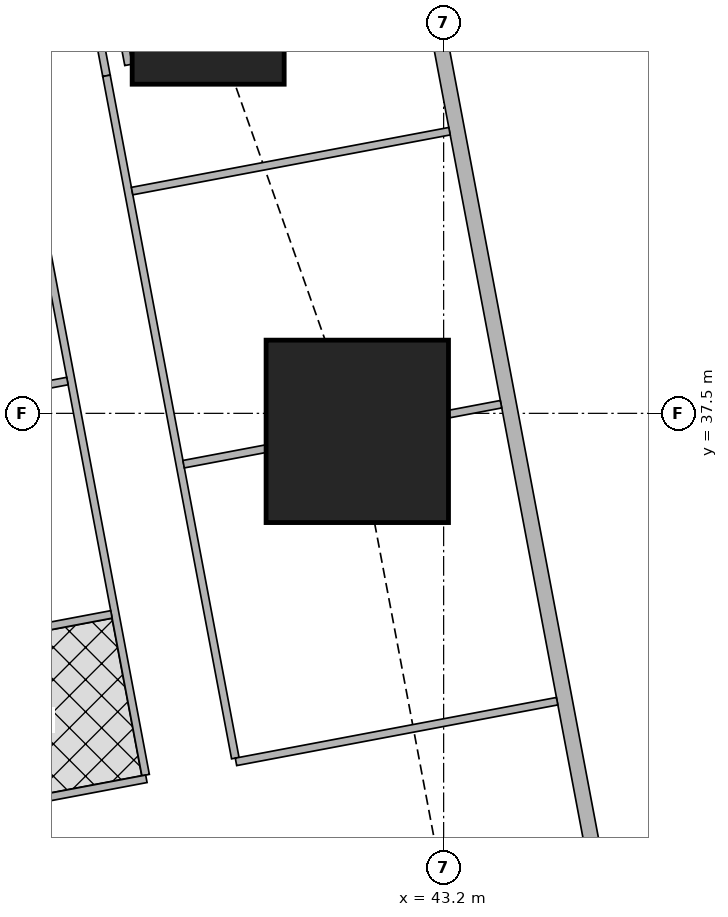
"""IFC4 building model, lengths in metres.
Left out: names, types, materials, properties, quantities, classifications, styles, units other than length and angle.
Written with IfcOpenShell. Run it as: python <this file> out.ifc"""

import sys

from ifc_helpers import new_model, si_unit, direction, frame, frame_2d, origin, origin_2d, place, context, subcontext, project, spatial, rectangle, extrude, element, fill, save


model = new_model("IFC4")
c1 = context("Model", 3, precision=1e-05, world=origin(), true_north=direction((0.0, 1.0)))
c2 = subcontext(c1, "Body", "Model", "MODEL_VIEW")
j1 = project(units=[si_unit("LENGTHUNIT", "METRE"), si_unit("PLANEANGLEUNIT", "RADIAN")], contexts=[c1])
p1 = place(None, origin())
s1 = spatial("IfcSite", under=j1, at=p1, CompositionType="ELEMENT")
p2 = place(p1, origin())
s2 = spatial("IfcBuilding", under=s1, at=p2, CompositionType="ELEMENT")
p3 = place(p2, frame((0.0, 0.0, 234.95)))
s3 = spatial("IfcBuildingStorey", under=s2, at=p3, CompositionType="ELEMENT", Elevation=234.95)
p4 = place(p3, frame((42.064, 37.263, 0.0), z_axis=(0.0, 0.0, 1.0), x_axis=(1.0, 0.0, 0.0)))
e1 = element("IfcColumn", 1, at=p4, inside=s3, PredefinedType="COLUMN", context=c2, shape_type="SweptSolid", body=[
    extrude(rectangle(XDim=2.4, YDim=2.4, at=origin_2d()), origin(), (0.0, 0.0, 1.0), 3.75),
])
p5 = place(p3, frame((40.102, 42.83, 0.0), z_axis=(0.0, 0.0, 1.0), x_axis=(1.0, 0.0, 0.0)))
e2 = element("IfcColumn", 2, at=p5, inside=s3, PredefinedType="COLUMN", context=c2, shape_type="SweptSolid", body=[
    extrude(rectangle(XDim=2.0, YDim=2.0, at=origin_2d()), origin(), (0.0, 0.0, 1.0), 3.75),
])
p6 = place(p3, frame((50.653, 2.703, 0.0), z_axis=(0.0, 0.0, 1.0), x_axis=(-0.185612026696, 0.982623109613, 0.0)))
e3 = element("IfcWall", 3, at=p6, inside=s3, PredefinedType="SOLIDWALL", context=c2, shape_type="SweptSolid", body=[
    extrude(rectangle(XDim=41.393, YDim=0.2, at=frame_2d((20.697, 0.0))), origin(), (0.0, 0.0, 1.0), 3.5),
])
p7 = place(p6, frame((1.633, 0.0, 0.9)))
e4 = element("IfcOpeningElement", 4, at=p7, cuts=e3, PredefinedType="OPENING", context=c2, shape_type="SweptSolid", body=[
    extrude(rectangle(XDim=1.8, YDim=1.5, at=frame_2d((0.9, 0.75))), frame((0.0, 0.11, 0.0), z_axis=(0.0, -1.0, 0.0), x_axis=(1.0, 0.0, 0.0)), (0.0, 0.0, 1.0), 0.22),
])
p8 = place(p6, frame((6.032, 0.0, 0.9)))
e5 = element("IfcOpeningElement", 5, at=p8, cuts=e3, PredefinedType="OPENING", context=c2, shape_type="SweptSolid", body=[
    extrude(rectangle(XDim=1.8, YDim=1.5, at=frame_2d((0.9, 0.75))), frame((0.0, 0.11, 0.0), z_axis=(0.0, -1.0, 0.0), x_axis=(1.0, 0.0, 0.0)), (0.0, 0.0, 1.0), 0.22),
])
p9 = place(p6, frame((9.848, 0.0, 0.9)))
e6 = element("IfcOpeningElement", 6, at=p9, cuts=e3, PredefinedType="OPENING", context=c2, shape_type="SweptSolid", body=[
    extrude(rectangle(XDim=1.8, YDim=1.5, at=frame_2d((0.9, 0.75))), frame((0.0, 0.11, 0.0), z_axis=(0.0, -1.0, 0.0), x_axis=(1.0, 0.0, 0.0)), (0.0, 0.0, 1.0), 0.22),
])
p10 = place(p6, frame((13.664, 0.0, 0.9)))
e7 = element("IfcOpeningElement", 7, at=p10, cuts=e3, PredefinedType="OPENING", context=c2, shape_type="SweptSolid", body=[
    extrude(rectangle(XDim=1.8, YDim=1.5, at=frame_2d((0.9, 0.75))), frame((0.0, 0.11, 0.0), z_axis=(0.0, -1.0, 0.0), x_axis=(1.0, 0.0, 0.0)), (0.0, 0.0, 1.0), 0.22),
])
p11 = place(p6, frame((17.481, 0.0, 0.9)))
e8 = element("IfcOpeningElement", 8, at=p11, cuts=e3, PredefinedType="OPENING", context=c2, shape_type="SweptSolid", body=[
    extrude(rectangle(XDim=1.8, YDim=1.5, at=frame_2d((0.9, 0.75))), frame((0.0, 0.11, 0.0), z_axis=(0.0, -1.0, 0.0), x_axis=(1.0, 0.0, 0.0)), (0.0, 0.0, 1.0), 0.22),
])
p12 = place(p6, frame((21.297, 0.0, 0.9)))
e9 = element("IfcOpeningElement", 9, at=p12, cuts=e3, PredefinedType="OPENING", context=c2, shape_type="SweptSolid", body=[
    extrude(rectangle(XDim=1.8, YDim=1.5, at=frame_2d((0.9, 0.75))), frame((0.0, 0.11, 0.0), z_axis=(0.0, -1.0, 0.0), x_axis=(1.0, 0.0, 0.0)), (0.0, 0.0, 1.0), 0.22),
])
p13 = place(p6, frame((25.113, 0.0, 0.9)))
e10 = element("IfcOpeningElement", 10, at=p13, cuts=e3, PredefinedType="OPENING", context=c2, shape_type="SweptSolid", body=[
    extrude(rectangle(XDim=1.8, YDim=1.5, at=frame_2d((0.9, 0.75))), frame((0.0, 0.11, 0.0), z_axis=(0.0, -1.0, 0.0), x_axis=(1.0, 0.0, 0.0)), (0.0, 0.0, 1.0), 0.22),
])
p14 = place(p6, frame((28.93, 0.0, 0.9)))
e11 = element("IfcOpeningElement", 11, at=p14, cuts=e3, PredefinedType="OPENING", context=c2, shape_type="SweptSolid", body=[
    extrude(rectangle(XDim=1.8, YDim=1.5, at=frame_2d((0.9, 0.75))), frame((0.0, 0.11, 0.0), z_axis=(0.0, -1.0, 0.0), x_axis=(1.0, 0.0, 0.0)), (0.0, 0.0, 1.0), 0.22),
])
p15 = place(p6, frame((32.746, 0.0, 0.9)))
e12 = element("IfcOpeningElement", 12, at=p15, cuts=e3, PredefinedType="OPENING", context=c2, shape_type="SweptSolid", body=[
    extrude(rectangle(XDim=1.8, YDim=1.5, at=frame_2d((0.9, 0.75))), frame((0.0, 0.11, 0.0), z_axis=(0.0, -1.0, 0.0), x_axis=(1.0, 0.0, 0.0)), (0.0, 0.0, 1.0), 0.22),
])
p16 = place(p6, frame((36.481, 0.0, 0.9)))
e13 = element("IfcOpeningElement", 13, at=p16, cuts=e3, PredefinedType="OPENING", context=c2, shape_type="SweptSolid", body=[
    extrude(rectangle(XDim=1.8, YDim=1.5, at=frame_2d((0.9, 0.75))), frame((0.0, 0.11, 0.0), z_axis=(0.0, -1.0, 0.0), x_axis=(1.0, 0.0, 0.0)), (0.0, 0.0, 1.0), 0.22),
])
p17 = place(p3, frame((33.933, 42.73, 0.0), z_axis=(0.0, 0.0, 1.0), x_axis=(0.185595417643, -0.982626246825, 0.0)))
e14 = element("IfcWall", 14, at=p17, inside=s3, PredefinedType="SOLIDWALL", context=c2, shape_type="SweptSolid", body=[
    extrude(rectangle(XDim=41.051, YDim=0.15, at=frame_2d((20.525, 0.0))), origin(), (0.0, 0.0, 1.0), 2.5),
])
p18 = place(p17, frame((12.266, 0.0, 0.0)))
e15 = element("IfcOpeningElement", 15, at=p18, cuts=e14, PredefinedType="OPENING", context=c2, shape_type="SweptSolid", body=[
    extrude(rectangle(XDim=1.0, YDim=2.1, at=frame_2d((0.5, 1.05))), frame((0.0, 0.085, 0.0), z_axis=(0.0, -1.0, 0.0), x_axis=(1.0, 0.0, 0.0)), (0.0, 0.0, 1.0), 0.17),
])
p19 = place(p17, frame((16.082, 0.0, 0.0)))
e16 = element("IfcOpeningElement", 16, at=p19, cuts=e14, PredefinedType="OPENING", context=c2, shape_type="SweptSolid", body=[
    extrude(rectangle(XDim=1.0, YDim=2.1, at=frame_2d((0.5, 1.05))), frame((0.0, 0.085, 0.0), z_axis=(0.0, -1.0, 0.0), x_axis=(1.0, 0.0, 0.0)), (0.0, 0.0, 1.0), 0.17),
])
p20 = place(p17, frame((30.862, 0.0, 0.0)))
e17 = element("IfcOpeningElement", 17, at=p20, cuts=e14, PredefinedType="OPENING", context=c2, shape_type="SweptSolid", body=[
    extrude(rectangle(XDim=1.0, YDim=2.1, at=frame_2d((0.5, 1.05))), frame((0.0, 0.085, 0.0), z_axis=(0.0, -1.0, 0.0), x_axis=(1.0, 0.0, 0.0)), (0.0, 0.0, 1.0), 0.17),
])
p21 = place(p3, frame((39.054, 42.085, 0.0), z_axis=(0.0, 0.0, 1.0), x_axis=(-0.185791584218, 0.982589175207, 0.0)))
e18 = element("IfcWall", 18, at=p21, inside=s3, PredefinedType="PARTITIONING", context=c2, shape_type="SweptSolid", body=[
    extrude(rectangle(XDim=3.628, YDim=0.1, at=frame_2d((1.814, 0.0))), origin(), (0.0, 0.0, 1.0), 2.05),
])
p22 = place(p3, frame((38.256, 44.628, 0.0), z_axis=(0.0, 0.0, 1.0), x_axis=(0.185700639943, -0.982606366927, 0.0)))
e19 = element("IfcWall", 19, at=p22, inside=s3, PredefinedType="PARTITIONING", context=c2, shape_type="SweptSolid", body=[
    extrude(rectangle(XDim=2.735, YDim=0.1, at=frame_2d((1.367, 0.0))), origin(), (0.0, 0.0, 1.0), 2.05),
])
p23 = place(p3, frame((38.764, 41.941, 0.0), z_axis=(0.0, 0.0, 1.0), x_axis=(0.185548572312, -0.982635093671, 0.0)))
e20 = element("IfcWall", 20, at=p23, inside=s3, PredefinedType="PARTITIONING", context=c2, shape_type="SweptSolid", body=[
    extrude(rectangle(XDim=9.135, YDim=0.1, at=frame_2d((4.568, 0.0))), origin(), (0.0, 0.0, 1.0), 3.5),
])
p24 = place(p23, frame((8.085, 0.0, 0.0)))
e21 = element("IfcOpeningElement", 21, at=p24, cuts=e20, PredefinedType="OPENING", context=c2, shape_type="SweptSolid", body=[
    extrude(rectangle(XDim=0.9, YDim=2.1, at=frame_2d((0.45, 1.05))), frame((0.0, 0.06, 0.0), z_axis=(0.0, -1.0, 0.0), x_axis=(1.0, 0.0, 0.0)), (0.0, 0.0, 1.0), 0.12),
])
p25 = place(p23, frame((3.7, 0.0, 0.0)))
e22 = element("IfcOpeningElement", 22, at=p25, cuts=e20, PredefinedType="OPENING", context=c2, shape_type="SweptSolid", body=[
    extrude(rectangle(XDim=0.9, YDim=2.1, at=frame_2d((0.45, 1.05))), frame((0.0, 0.06, 0.0), z_axis=(0.0, -1.0, 0.0), x_axis=(1.0, 0.0, 0.0)), (0.0, 0.0, 1.0), 0.12),
])
p26 = place(p3, frame((37.473, 42.309, 0.0), z_axis=(0.0, 0.0, 1.0), x_axis=(0.185491912953, -0.982645790827, 0.0)))
e23 = element("IfcWall", 23, at=p26, inside=s3, PredefinedType="PARTITIONING", context=c2, shape_type="SweptSolid", body=[
    extrude(rectangle(XDim=9.737, YDim=0.1, at=frame_2d((4.869, 0.0))), origin(), (0.0, 0.0, 1.0), 3.5),
])
p27 = place(p26, frame((8.232, 0.0, 0.0)))
e24 = element("IfcOpeningElement", 24, at=p27, cuts=e23, PredefinedType="OPENING", context=c2, shape_type="SweptSolid", body=[
    extrude(rectangle(XDim=0.9, YDim=2.1, at=frame_2d((0.45, 1.05))), frame((0.0, 0.06, 0.0), z_axis=(0.0, -1.0, 0.0), x_axis=(1.0, 0.0, 0.0)), (0.0, 0.0, 1.0), 0.12),
])
p28 = place(p26, frame((2.853, 0.0, 0.0)))
e25 = element("IfcOpeningElement", 25, at=p28, cuts=e23, PredefinedType="OPENING", context=c2, shape_type="SweptSolid", body=[
    extrude(rectangle(XDim=0.9, YDim=2.1, at=frame_2d((0.45, 1.05))), frame((0.0, 0.06, 0.0), z_axis=(0.0, -1.0, 0.0), x_axis=(1.0, 0.0, 0.0)), (0.0, 0.0, 1.0), 0.12),
])
p29 = place(p26, frame((5.564, 0.0, 0.0)))
e26 = element("IfcOpeningElement", 26, at=p29, cuts=e23, PredefinedType="OPENING", context=c2, shape_type="SweptSolid", body=[
    extrude(rectangle(XDim=0.9, YDim=2.1, at=frame_2d((0.45, 1.05))), frame((0.0, 0.06, 0.0), z_axis=(0.0, -1.0, 0.0), x_axis=(1.0, 0.0, 0.0)), (0.0, 0.0, 1.0), 0.12),
])
p30 = place(p3, frame((43.277, 41.212, 0.0), z_axis=(0.0, 0.0, 1.0), x_axis=(-0.982665405803, -0.185387972203, 0.0)))
e27 = element("IfcWall", 27, at=p30, inside=s3, PredefinedType="PARTITIONING", context=c2, shape_type="SweptSolid", body=[
    extrude(rectangle(XDim=4.25, YDim=0.1, at=frame_2d((2.125, 0.0))), origin(), (0.0, 0.0, 1.0), 2.05),
])
p31 = place(p3, frame((43.955, 37.62, 0.0), z_axis=(0.0, 0.0, 1.0), x_axis=(-0.982495415327, -0.186286765128, 0.0)))
e28 = element("IfcWall", 28, at=p31, inside=s3, PredefinedType="PARTITIONING", context=c2, shape_type="SweptSolid", body=[
    extrude(rectangle(XDim=0.693, YDim=0.1, at=frame_2d((0.347, 0.0))), origin(), (0.0, 0.0, 1.0), 3.5),
])
p32 = place(p3, frame((40.854, 37.034, 0.0), z_axis=(0.0, 0.0, 1.0), x_axis=(-0.982651678759, -0.185460718839, 0.0)))
e29 = element("IfcWall", 29, at=p32, inside=s3, PredefinedType="PARTITIONING", context=c2, shape_type="SweptSolid", body=[
    extrude(rectangle(XDim=1.094, YDim=0.1, at=frame_2d((0.547, 0.0))), origin(), (0.0, 0.0, 1.0), 3.5),
])
p33 = place(p3, frame((44.693, 33.713, 0.0), z_axis=(0.0, 0.0, 1.0), x_axis=(-0.982633535512, -0.185556823879, 0.0)))
e30 = element("IfcWall", 30, at=p33, inside=s3, PredefinedType="PARTITIONING", context=c2, shape_type="SweptSolid", body=[
    extrude(rectangle(XDim=4.3, YDim=0.1, at=frame_2d((2.15, 0.0))), origin(), (0.0, 0.0, 1.0), 2.05),
])
p34 = place(p3, frame((38.25, 37.925, 0.0), z_axis=(0.0, 0.0, 1.0), x_axis=(-0.982610209589, -0.185680305934, 0.0)))
e31 = element("IfcWall", 31, at=p34, inside=s3, PredefinedType="PARTITIONING", context=c2, shape_type="SweptSolid", body=[
    extrude(rectangle(XDim=1.567, YDim=0.1, at=frame_2d((0.784, 0.0))), origin(), (0.0, 0.0, 1.0), 3.5),
])
p35 = place(p3, frame((39.289, 32.692, 0.0), z_axis=(0.0, 0.0, 1.0), x_axis=(-0.982633623707, -0.185556356831, 0.0)))
e32 = element("IfcWall", 32, at=p35, inside=s3, PredefinedType="PARTITIONING", context=c2, shape_type="SweptSolid", body=[
    extrude(rectangle(XDim=3.325, YDim=0.1, at=frame_2d((1.663, 0.0))), origin(), (0.0, 0.0, 1.0), 3.5),
])
p36 = place(p3, frame((38.829, 34.855, 0.0), z_axis=(0.0, 0.0, 1.0), x_axis=(-0.982610347627, -0.185679575441, 0.0)))
e33 = element("IfcWall", 33, at=p36, inside=s3, PredefinedType="PARTITIONING", context=c2, shape_type="SweptSolid", body=[
    extrude(rectangle(XDim=3.274, YDim=0.1, at=frame_2d((1.637, 0.0))), origin(), (0.0, 0.0, 1.0), 3.5),
])
p37 = place(p3, frame((38.202, 10.163, 0.0), z_axis=(0.0, 0.0, 1.0), x_axis=(-0.185610321132, 0.982623431783, 0.0)))
e34 = element("IfcWall", 34, at=p37, inside=s3, PredefinedType="PARTITIONING", context=c2, shape_type="SweptSolid", body=[
    extrude(rectangle(XDim=25.111, YDim=0.125, at=frame_2d((12.556, 0.0))), origin(), (0.0, 0.0, 1.0), 2.5),
])
p38 = place(p37, frame((0.708, 0.0, 0.0)))
e35 = element("IfcOpeningElement", 35, at=p38, cuts=e34, PredefinedType="OPENING", context=c2, shape_type="SweptSolid", body=[
    extrude(rectangle(XDim=1.0, YDim=2.1, at=frame_2d((0.5, 1.05))), frame((0.0, 0.073, 0.0), z_axis=(0.0, -1.0, 0.0), x_axis=(1.0, 0.0, 0.0)), (0.0, 0.0, 1.0), 0.145),
])
p39 = place(p37, frame((13.378, 0.0, 0.0)))
e36 = element("IfcOpeningElement", 36, at=p39, cuts=e34, PredefinedType="OPENING", context=c2, shape_type="SweptSolid", body=[
    extrude(rectangle(XDim=1.0, YDim=2.1, at=frame_2d((0.5, 1.05))), frame((0.0, 0.073, 0.0), z_axis=(0.0, -1.0, 0.0), x_axis=(1.0, 0.0, 0.0)), (0.0, 0.0, 1.0), 0.145),
])
p40 = place(p37, frame((21.15, 0.0, 0.0)))
e37 = element("IfcOpeningElement", 37, at=p40, cuts=e34, PredefinedType="OPENING", context=c2, shape_type="SweptSolid", body=[
    extrude(rectangle(XDim=1.0, YDim=2.1, at=frame_2d((0.5, 1.05))), frame((0.0, 0.073, 0.0), z_axis=(0.0, -1.0, 0.0), x_axis=(1.0, 0.0, 0.0)), (0.0, 0.0, 1.0), 0.145),
])
p41 = place(p37, frame((23.453, 0.0, 0.0)))
e38 = element("IfcOpeningElement", 38, at=p41, cuts=e34, PredefinedType="OPENING", context=c2, shape_type="SweptSolid", body=[
    extrude(rectangle(XDim=1.0, YDim=2.1, at=frame_2d((0.5, 1.05))), frame((0.0, 0.073, 0.0), z_axis=(0.0, -1.0, 0.0), x_axis=(1.0, 0.0, 0.0)), (0.0, 0.0, 1.0), 0.145),
])
p42 = place(p14, origin())
e39 = element("IfcWindow", 39, at=p42, inside=s3, PartitioningType="SINGLE_PANEL", PredefinedType="WINDOW", context=c2, shape_type="SweptSolid", body=[
    extrude(rectangle(XDim=1.8, YDim=1.5, at=frame_2d((0.9, 0.75))), frame((0.0, 0.03, 0.0), z_axis=(0.0, -1.0, 0.0), x_axis=(1.0, 0.0, 0.0)), (0.0, 0.0, 1.0), 0.06),
])
fill(e11, e39)
p43 = place(p15, origin())
e40 = element("IfcWindow", 40, at=p43, inside=s3, PartitioningType="SINGLE_PANEL", PredefinedType="WINDOW", context=c2, shape_type="SweptSolid", body=[
    extrude(rectangle(XDim=1.8, YDim=1.5, at=frame_2d((0.9, 0.75))), frame((0.0, 0.03, 0.0), z_axis=(0.0, -1.0, 0.0), x_axis=(1.0, 0.0, 0.0)), (0.0, 0.0, 1.0), 0.06),
])
fill(e12, e40)
p44 = place(p16, origin())
e41 = element("IfcWindow", 41, at=p44, inside=s3, PartitioningType="SINGLE_PANEL", PredefinedType="WINDOW", context=c2, shape_type="SweptSolid", body=[
    extrude(rectangle(XDim=1.8, YDim=1.5, at=frame_2d((0.9, 0.75))), frame((0.0, 0.03, 0.0), z_axis=(0.0, -1.0, 0.0), x_axis=(1.0, 0.0, 0.0)), (0.0, 0.0, 1.0), 0.06),
])
fill(e13, e41)
p45 = place(p24, origin())
e42 = element("IfcDoor", 42, at=p45, inside=s3, OperationType="SINGLE_SWING_RIGHT", PredefinedType="DOOR", context=c2, shape_type="SweptSolid", body=[
    extrude(rectangle(XDim=0.9, YDim=2.1, at=frame_2d((0.45, 1.05))), frame((0.0, 0.025, 0.0), z_axis=(0.0, -1.0, 0.0), x_axis=(1.0, 0.0, 0.0)), (0.0, 0.0, 1.0), 0.05),
])
fill(e21, e42)
p46 = place(p25, origin())
e43 = element("IfcDoor", 43, at=p46, inside=s3, OperationType="SINGLE_SWING_RIGHT", PredefinedType="DOOR", context=c2, shape_type="SweptSolid", body=[
    extrude(rectangle(XDim=0.9, YDim=2.1, at=frame_2d((0.45, 1.05))), frame((0.0, 0.025, 0.0), z_axis=(0.0, -1.0, 0.0), x_axis=(1.0, 0.0, 0.0)), (0.0, 0.0, 1.0), 0.05),
])
fill(e22, e43)
p47 = place(p27, origin())
e44 = element("IfcDoor", 44, at=p47, inside=s3, OperationType="SINGLE_SWING_LEFT", PredefinedType="DOOR", context=c2, shape_type="SweptSolid", body=[
    extrude(rectangle(XDim=0.9, YDim=2.1, at=frame_2d((0.45, 1.05))), frame((0.0, 0.025, 0.0), z_axis=(0.0, -1.0, 0.0), x_axis=(1.0, 0.0, 0.0)), (0.0, 0.0, 1.0), 0.05),
])
fill(e24, e44)
p48 = place(p28, origin())
e45 = element("IfcDoor", 45, at=p48, inside=s3, OperationType="SINGLE_SWING_RIGHT", PredefinedType="DOOR", context=c2, shape_type="SweptSolid", body=[
    extrude(rectangle(XDim=0.9, YDim=2.1, at=frame_2d((0.45, 1.05))), frame((0.0, 0.025, 0.0), z_axis=(0.0, -1.0, 0.0), x_axis=(1.0, 0.0, 0.0)), (0.0, 0.0, 1.0), 0.05),
])
fill(e25, e45)
p49 = place(p29, origin())
e46 = element("IfcDoor", 46, at=p49, inside=s3, OperationType="SINGLE_SWING_RIGHT", PredefinedType="DOOR", context=c2, shape_type="SweptSolid", body=[
    extrude(rectangle(XDim=0.9, YDim=2.1, at=frame_2d((0.45, 1.05))), frame((0.0, 0.025, 0.0), z_axis=(0.0, -1.0, 0.0), x_axis=(1.0, 0.0, 0.0)), (0.0, 0.0, 1.0), 0.05),
])
fill(e26, e46)
save(model, sys.argv[1])
